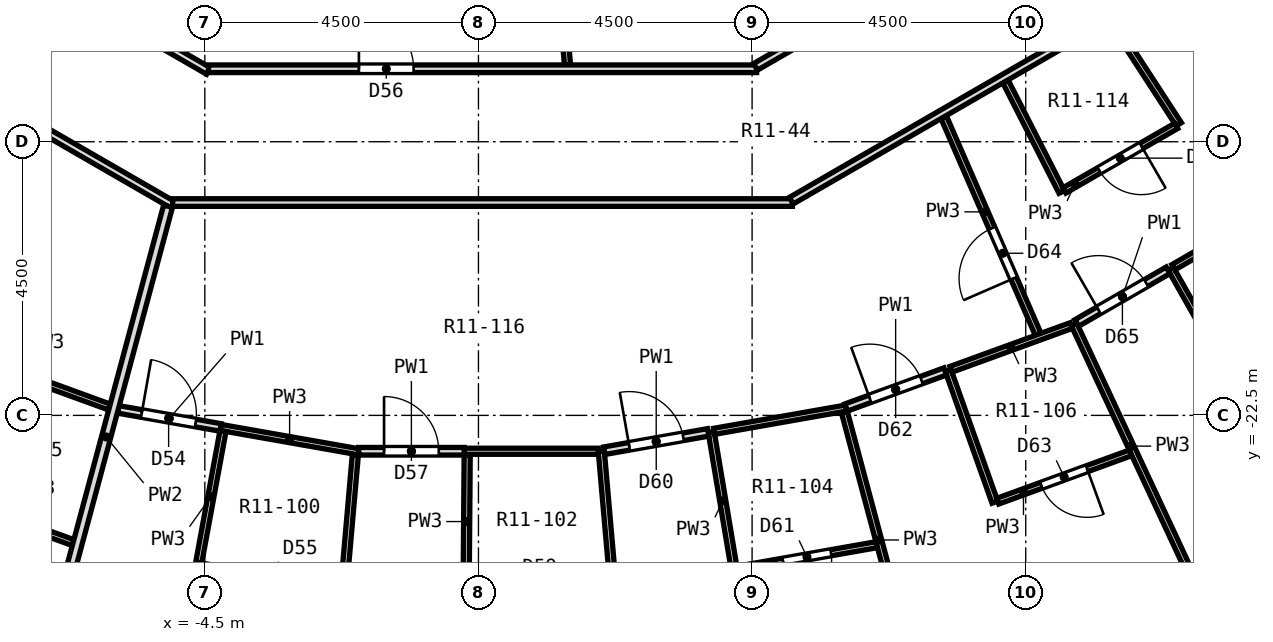
"""IFC4 building model, lengths in metres.
Left out: names, types, materials, properties, quantities, classifications, styles, units other than length and angle.
Written with IfcOpenShell. Run it as: python <this file> out.ifc"""

import sys

from ifc_helpers import new_model, si_unit, direction, frame, frame_2d, origin, origin_2d, place, context, subcontext, project, spatial, rectangle, extrude, element, fill, save


model = new_model("IFC4")
c1 = context("Model", 3, precision=1e-05, world=origin(), true_north=direction((0.0, 1.0)))
c2 = subcontext(c1, "Body", "Model", "MODEL_VIEW")
j1 = project(units=[si_unit("LENGTHUNIT", "METRE"), si_unit("PLANEANGLEUNIT", "RADIAN")], contexts=[c1])
p1 = place(None, origin())
s1 = spatial("IfcSite", under=j1, at=p1, CompositionType="ELEMENT")
p2 = place(p1, origin())
s2 = spatial("IfcBuilding", under=s1, at=p2, CompositionType="ELEMENT")
p3 = place(p2, frame((0.0, 0.0, 46.1)))
s3 = spatial("IfcBuildingStorey", under=s2, at=p3, CompositionType="ELEMENT", Elevation=46.1)
p4 = place(p3, frame((11.897, -25.512, 0.0), z_axis=(0.0, 0.0, 1.0), x_axis=(0.422618261741, -0.906307787037, 0.0)))
e1 = element("IfcColumn", 1, at=p4, inside=s3, PredefinedType="COLUMN", context=c2, shape_type="SweptSolid", body=[
    extrude(rectangle(XDim=1.1, YDim=1.1, at=origin_2d()), origin(), (0.0, 0.0, 1.0), 3.3),
])
p5 = place(p3, frame((1.119, -12.8, 0.0), z_axis=(0.0, 0.0, 1.0), x_axis=(0.087327835862, -0.996179626917, 0.0)))
e2 = element("IfcWall", 2, at=p5, inside=s3, PredefinedType="PARTITIONING", context=c2, shape_type="SweptSolid", body=[
    extrude(rectangle(XDim=3.953, YDim=0.1, at=frame_2d((1.977, 0.0))), origin(), (0.0, 0.0, 1.0), 2.75),
])
p6 = place(p3, frame((2.02, -23.09, 0.0), z_axis=(0.0, 0.0, 1.0), x_axis=(0.087326902968, -0.996179708696, 0.0)))
e3 = element("IfcWall", 3, at=p6, inside=s3, PredefinedType="PARTITIONING", context=c2, shape_type="SweptSolid", body=[
    extrude(rectangle(XDim=4.412, YDim=0.1, at=frame_2d((2.206, 0.0))), origin(), (0.0, 0.0, 1.0), 2.75),
])
p7 = place(p3, frame((3.827, -22.771, 0.0), z_axis=(0.0, 0.0, 1.0), x_axis=(0.165707124798, -0.98617500921, 0.0)))
e4 = element("IfcWall", 4, at=p7, inside=s3, PredefinedType="PARTITIONING", context=c2, shape_type="SweptSolid", body=[
    extrude(rectangle(XDim=2.3, YDim=0.1, at=frame_2d((1.15, 0.0))), origin(), (0.0, 0.0, 1.0), 2.75),
])
p8 = place(p3, frame((6.018, -22.448, 0.0), z_axis=(0.0, 0.0, 1.0), x_axis=(0.258193625059, -0.966093190111, 0.0)))
e5 = element("IfcWall", 5, at=p8, inside=s3, PredefinedType="PARTITIONING", context=c2, shape_type="SweptSolid", body=[
    extrude(rectangle(XDim=4.35, YDim=0.1, at=frame_2d((2.175, 0.0))), origin(), (0.0, 0.0, 1.0), 2.75),
])
p9 = place(p3, frame((7.723, -21.76, 0.0), z_axis=(0.0, 0.0, 1.0), x_axis=(0.334695622164, -0.942326291952, 0.0)))
e6 = element("IfcWall", 6, at=p9, inside=s3, PredefinedType="PARTITIONING", context=c2, shape_type="SweptSolid", body=[
    extrude(rectangle(XDim=2.301, YDim=0.1, at=frame_2d((1.15, 0.0))), origin(), (0.0, 0.0, 1.0), 2.75),
])
p10 = place(p3, frame((7.65, -17.594, 0.0), z_axis=(0.0, 0.0, 1.0), x_axis=(0.398813158587, -0.917032204744, 0.0)))
e7 = element("IfcWall", 7, at=p10, inside=s3, PredefinedType="PARTITIONING", context=c2, shape_type="SweptSolid", body=[
    extrude(rectangle(XDim=3.897, YDim=0.1, at=frame_2d((1.948, 0.0))), origin(), (0.0, 0.0, 1.0), 2.75),
])
p11 = place(p10, frame((1.992, 0.0, 0.0)))
e8 = element("IfcOpeningElement", 8, at=p11, cuts=e7, PredefinedType="OPENING", context=c2, shape_type="SweptSolid", body=[
    extrude(rectangle(XDim=0.9, YDim=2.1, at=frame_2d((0.45, 1.05))), frame((0.0, 0.062, 0.0), z_axis=(0.0, -1.0, 0.0), x_axis=(1.0, 0.0, 0.0)), (0.0, 0.0, 1.0), 0.124),
])
p12 = place(p3, frame((9.795, -21.006, 0.0), z_axis=(0.0, 0.0, 1.0), x_axis=(0.422658280027, -0.906289125127, 0.0)))
e9 = element("IfcWall", 9, at=p12, inside=s3, PredefinedType="PARTITIONING", context=c2, shape_type="SweptSolid", body=[
    extrude(rectangle(XDim=4.413, YDim=0.1, at=frame_2d((2.206, 0.0))), origin(), (0.0, 0.0, 1.0), 2.75),
])
p13 = place(p3, frame((8.667, -17.008, 0.0), z_axis=(0.0, 0.0, 1.0), x_axis=(0.453664033068, -0.891172791944, 0.0)))
e10 = element("IfcWall", 10, at=p13, inside=s3, PredefinedType="PARTITIONING", context=c2, shape_type="SweptSolid", body=[
    extrude(rectangle(XDim=2.04, YDim=0.1, at=frame_2d((1.02, 0.0))), origin(), (0.0, 0.0, 1.0), 2.75),
])
p14 = place(p3, frame((11.385, -20.089, 0.0), z_axis=(0.0, 0.0, 1.0), x_axis=(0.49306078006, -0.869994866173, 0.0)))
e11 = element("IfcWall", 11, at=p14, inside=s3, PredefinedType="PARTITIONING", context=c2, shape_type="SweptSolid", body=[
    extrude(rectangle(XDim=2.3, YDim=0.1, at=frame_2d((1.15, 0.0))), origin(), (0.0, 0.0, 1.0), 2.75),
])
p15 = place(p3, frame((10.406, -16.003, 0.0), z_axis=(0.0, 0.0, 1.0), x_axis=(0.545026202076, -0.838419011623, 0.0)))
e12 = element("IfcWall", 12, at=p15, inside=s3, PredefinedType="PARTITIONING", context=c2, shape_type="SweptSolid", body=[
    extrude(rectangle(XDim=2.04, YDim=0.1, at=frame_2d((1.02, 0.0))), origin(), (0.0, 0.0, 1.0), 2.75),
])
p16 = place(p3, frame((-13.855, -13.94, 0.0), z_axis=(0.0, 0.0, 1.0), x_axis=(0.866024825845, -0.50000100102, 0.0)))
e13 = element("IfcWall", 13, at=p16, inside=s3, PredefinedType="PARTITIONING", context=c2, shape_type="SweptSolid", body=[
    extrude(rectangle(XDim=10.192, YDim=0.125, at=frame_2d((5.096, 0.0))), origin(), (0.0, 0.0, 1.0), 2.75),
])
p17 = place(p3, frame((-12.298, -12.298, 0.0), z_axis=(0.0, 0.0, 1.0), x_axis=(0.865982621983, -0.500074092933, 0.0)))
e14 = element("IfcWall", 14, at=p17, inside=s3, PredefinedType="PARTITIONING", context=c2, shape_type="SweptSolid", body=[
    extrude(rectangle(XDim=9.075, YDim=0.125, at=frame_2d((4.537, 0.0))), origin(), (0.0, 0.0, 1.0), 2.75),
])
p18 = place(p17, frame((3.281, 0.0, 0.0)))
e15 = element("IfcOpeningElement", 15, at=p18, cuts=e14, PredefinedType="OPENING", context=c2, shape_type="SweptSolid", body=[
    extrude(rectangle(XDim=0.9, YDim=2.1, at=frame_2d((0.45, 1.05))), frame((0.0, 0.074, 0.0), z_axis=(0.0, -1.0, 0.0), x_axis=(1.0, 0.0, 0.0)), (0.0, 0.0, 1.0), 0.149),
])
p19 = place(p3, frame((-8.875, -23.789, 0.0), z_axis=(0.0, 0.0, 1.0), x_axis=(0.939775222713, -0.341793111069, 0.0)))
e16 = element("IfcWall", 16, at=p19, inside=s3, PredefinedType="PARTITIONING", context=c2, shape_type="SweptSolid", body=[
    extrude(rectangle(XDim=2.35, YDim=0.1, at=frame_2d((1.175, 0.0))), origin(), (0.0, 0.0, 1.0), 2.75),
])
p20 = place(p19, frame((0.812, 0.0, 0.0)))
e17 = element("IfcOpeningElement", 17, at=p20, cuts=e16, PredefinedType="OPENING", context=c2, shape_type="SweptSolid", body=[
    extrude(rectangle(XDim=0.8, YDim=2.1, at=frame_2d((0.4, 1.05))), frame((0.0, 0.062, 0.0), z_axis=(0.0, -1.0, 0.0), x_axis=(1.0, 0.0, 0.0)), (0.0, 0.0, 1.0), 0.124),
])
p21 = place(p3, frame((-8.118, -21.617, 0.0), z_axis=(0.0, 0.0, 1.0), x_axis=(0.939718185991, -0.341949895332, 0.0)))
e18 = element("IfcWall", 18, at=p21, inside=s3, PredefinedType="PARTITIONING", context=c2, shape_type="SweptSolid", body=[
    extrude(rectangle(XDim=2.18, YDim=0.1, at=frame_2d((1.09, 0.0))), origin(), (0.0, 0.0, 1.0), 2.75),
])
p22 = place(p3, frame((-4.609, -24.969, 0.0), z_axis=(0.0, 0.0, 1.0), x_axis=(0.984808388541, -0.173644573363, 0.0)))
e19 = element("IfcWall", 19, at=p22, inside=s3, PredefinedType="PARTITIONING", context=c2, shape_type="SweptSolid", body=[
    extrude(rectangle(XDim=2.375, YDim=0.1, at=frame_2d((1.188, 0.0))), origin(), (0.0, 0.0, 1.0), 2.75),
])
p23 = place(p22, frame((0.812, 0.0, 0.0)))
e20 = element("IfcOpeningElement", 20, at=p23, cuts=e19, PredefinedType="OPENING", context=c2, shape_type="SweptSolid", body=[
    extrude(rectangle(XDim=0.8, YDim=2.1, at=frame_2d((0.4, 1.05))), frame((0.0, 0.062, 0.0), z_axis=(0.0, -1.0, 0.0), x_axis=(1.0, 0.0, 0.0)), (0.0, 0.0, 1.0), 0.124),
])
p24 = place(p3, frame((-4.241, -22.698, 0.0), z_axis=(0.0, 0.0, 1.0), x_axis=(0.984796344358, -0.173712866935, 0.0)))
e21 = element("IfcWall", 21, at=p24, inside=s3, PredefinedType="PARTITIONING", context=c2, shape_type="SweptSolid", body=[
    extrude(rectangle(XDim=2.306, YDim=0.1, at=frame_2d((1.153, 0.0))), origin(), (0.0, 0.0, 1.0), 2.75),
])
p25 = place(p3, frame((-5.925, -22.401, 0.0), z_axis=(0.0, 0.0, 1.0), x_axis=(0.984786433544, -0.173769043008, 0.0)))
e22 = element("IfcWall", 22, at=p25, inside=s3, PredefinedType="PARTITIONING", context=c2, shape_type="SweptSolid", body=[
    extrude(rectangle(XDim=1.71, YDim=0.125, at=frame_2d((0.855, 0.0))), origin(), (0.0, 0.0, 1.0), 2.75),
])
p26 = place(p25, frame((0.393, 0.0, 0.0)))
e23 = element("IfcOpeningElement", 23, at=p26, cuts=e22, PredefinedType="OPENING", context=c2, shape_type="SweptSolid", body=[
    extrude(rectangle(XDim=0.9, YDim=2.1, at=frame_2d((0.45, 1.05))), frame((0.0, 0.074, 0.0), z_axis=(0.0, -1.0, 0.0), x_axis=(1.0, 0.0, 0.0)), (0.0, 0.0, 1.0), 0.149),
])
p27 = place(p3, frame((-0.235, -23.09, 0.0), z_axis=(0.0, 0.0, 1.0), x_axis=(1.0, 0.0, 0.0)))
e24 = element("IfcWall", 24, at=p27, inside=s3, PredefinedType="PARTITIONING", context=c2, shape_type="SweptSolid", body=[
    extrude(rectangle(XDim=2.205, YDim=0.1, at=frame_2d((1.103, 0.0))), origin(), (0.0, 0.0, 1.0), 2.75),
])
p28 = place(p3, frame((-1.97, -23.09, 0.0), z_axis=(0.0, 0.0, 1.0), x_axis=(1.0, 0.0, 0.0)))
e25 = element("IfcWall", 25, at=p28, inside=s3, PredefinedType="PARTITIONING", context=c2, shape_type="SweptSolid", body=[
    extrude(rectangle(XDim=1.735, YDim=0.125, at=frame_2d((0.867, 0.0))), origin(), (0.0, 0.0, 1.0), 2.75),
])
p29 = place(p28, frame((0.417, 0.0, 0.0)))
e26 = element("IfcOpeningElement", 26, at=p29, cuts=e25, PredefinedType="OPENING", context=c2, shape_type="SweptSolid", body=[
    extrude(rectangle(XDim=0.9, YDim=2.1, at=frame_2d((0.45, 1.05))), frame((0.0, 0.074, 0.0), z_axis=(0.0, -1.0, 0.0), x_axis=(1.0, 0.0, 0.0)), (0.0, 0.0, 1.0), 0.149),
])
p30 = place(p3, frame((-5.029, -19.0, 0.0), z_axis=(0.0, 0.0, 1.0), x_axis=(1.0, 0.0, 0.0)))
e27 = element("IfcWall", 27, at=p30, inside=s3, PredefinedType="PARTITIONING", context=c2, shape_type="SweptSolid", body=[
    extrude(rectangle(XDim=10.192, YDim=0.125, at=frame_2d((5.096, 0.0))), origin(), (0.0, 0.0, 1.0), 2.75),
])
p31 = place(p3, frame((-4.439, -16.8, 0.0), z_axis=(0.0, 0.0, 1.0), x_axis=(1.0, 0.0, 0.0)))
e28 = element("IfcWall", 28, at=p31, inside=s3, PredefinedType="PARTITIONING", context=c2, shape_type="SweptSolid", body=[
    extrude(rectangle(XDim=9.014, YDim=0.125, at=frame_2d((4.507, 0.0))), origin(), (0.0, 0.0, 1.0), 2.75),
])
p32 = place(p31, frame((2.473, 0.0, 0.0)))
e29 = element("IfcOpeningElement", 29, at=p32, cuts=e28, PredefinedType="OPENING", context=c2, shape_type="SweptSolid", body=[
    extrude(rectangle(XDim=0.9, YDim=2.1, at=frame_2d((0.45, 1.05))), frame((0.0, 0.074, 0.0), z_axis=(0.0, -1.0, 0.0), x_axis=(1.0, 0.0, 0.0)), (0.0, 0.0, 1.0), 0.149),
])
p33 = place(p3, frame((4.257, -25.03, 0.0), z_axis=(0.0, 0.0, 1.0), x_axis=(0.984818426074, 0.173587636842, 0.0)))
e30 = element("IfcWall", 30, at=p33, inside=s3, PredefinedType="PARTITIONING", context=c2, shape_type="SweptSolid", body=[
    extrude(rectangle(XDim=2.325, YDim=0.1, at=frame_2d((1.163, 0.0))), origin(), (0.0, 0.0, 1.0), 2.75),
])
p34 = place(p33, frame((0.762, 0.0, 0.0)))
e31 = element("IfcOpeningElement", 31, at=p34, cuts=e30, PredefinedType="OPENING", context=c2, shape_type="SweptSolid", body=[
    extrude(rectangle(XDim=0.8, YDim=2.1, at=frame_2d((0.4, 1.05))), frame((0.0, 0.062, 0.0), z_axis=(0.0, -1.0, 0.0), x_axis=(1.0, 0.0, 0.0)), (0.0, 0.0, 1.0), 0.124),
])
p35 = place(p3, frame((3.876, -22.762, 0.0), z_axis=(0.0, 0.0, 1.0), x_axis=(0.98481362095, 0.173614895648, 0.0)))
e32 = element("IfcWall", 32, at=p35, inside=s3, PredefinedType="PARTITIONING", context=c2, shape_type="SweptSolid", body=[
    extrude(rectangle(XDim=2.206, YDim=0.1, at=frame_2d((1.103, 0.0))), origin(), (0.0, 0.0, 1.0), 2.75),
])
p36 = place(p3, frame((2.069, -23.081, 0.0), z_axis=(0.0, 0.0, 1.0), x_axis=(0.984782142107, 0.173793361747, 0.0)))
e33 = element("IfcWall", 33, at=p36, inside=s3, PredefinedType="PARTITIONING", context=c2, shape_type="SweptSolid", body=[
    extrude(rectangle(XDim=1.735, YDim=0.125, at=frame_2d((0.867, 0.0))), origin(), (0.0, 0.0, 1.0), 2.75),
])
p37 = place(p36, frame((0.417, 0.0, 0.0)))
e34 = element("IfcOpeningElement", 34, at=p37, cuts=e33, PredefinedType="OPENING", context=c2, shape_type="SweptSolid", body=[
    extrude(rectangle(XDim=0.9, YDim=2.1, at=frame_2d((0.45, 1.05))), frame((0.0, 0.074, 0.0), z_axis=(0.0, -1.0, 0.0), x_axis=(1.0, 0.0, 0.0)), (0.0, 0.0, 1.0), 0.149),
])
p38 = place(p3, frame((8.54, -23.911, 0.0), z_axis=(0.0, 0.0, 1.0), x_axis=(0.939716717369, 0.34195393125, 0.0)))
e35 = element("IfcWall", 35, at=p38, inside=s3, PredefinedType="PARTITIONING", context=c2, shape_type="SweptSolid", body=[
    extrude(rectangle(XDim=2.324, YDim=0.1, at=frame_2d((1.162, 0.0))), origin(), (0.0, 0.0, 1.0), 2.75),
])
p39 = place(p38, frame((0.762, 0.0, 0.0)))
e36 = element("IfcOpeningElement", 36, at=p39, cuts=e35, PredefinedType="OPENING", context=c2, shape_type="SweptSolid", body=[
    extrude(rectangle(XDim=0.8, YDim=2.1, at=frame_2d((0.4, 1.05))), frame((0.0, 0.062, 0.0), z_axis=(0.0, -1.0, 0.0), x_axis=(1.0, 0.0, 0.0)), (0.0, 0.0, 1.0), 0.124),
])
p40 = place(p3, frame((7.77, -21.743, 0.0), z_axis=(0.0, 0.0, 1.0), x_axis=(0.939725675468, 0.341929312674, 0.0)))
e37 = element("IfcWall", 37, at=p40, inside=s3, PredefinedType="PARTITIONING", context=c2, shape_type="SweptSolid", body=[
    extrude(rectangle(XDim=2.105, YDim=0.1, at=frame_2d((1.052, 0.0))), origin(), (0.0, 0.0, 1.0), 2.75),
])
p41 = place(p3, frame((6.046, -22.371, 0.0), z_axis=(0.0, 0.0, 1.0), x_axis=(0.939612508188, 0.342240170722, 0.0)))
e38 = element("IfcWall", 38, at=p41, inside=s3, PredefinedType="PARTITIONING", context=c2, shape_type="SweptSolid", body=[
    extrude(rectangle(XDim=1.735, YDim=0.125, at=frame_2d((0.867, 0.0))), origin(), (0.0, 0.0, 1.0), 2.75),
])
p42 = place(p41, frame((0.417, 0.0, 0.0)))
e39 = element("IfcOpeningElement", 39, at=p42, cuts=e38, PredefinedType="OPENING", context=c2, shape_type="SweptSolid", body=[
    extrude(rectangle(XDim=0.9, YDim=2.1, at=frame_2d((0.45, 1.05))), frame((0.0, 0.074, 0.0), z_axis=(0.0, -1.0, 0.0), x_axis=(1.0, 0.0, 0.0)), (0.0, 0.0, 1.0), 0.149),
])
p43 = place(p3, frame((11.428, -20.064, 0.0), z_axis=(0.0, 0.0, 1.0), x_axis=(0.865870655861, 0.50026793553, 0.0)))
e40 = element("IfcWall", 40, at=p43, inside=s3, PredefinedType="PARTITIONING", context=c2, shape_type="SweptSolid", body=[
    extrude(rectangle(XDim=2.105, YDim=0.1, at=frame_2d((1.052, 0.0))), origin(), (0.0, 0.0, 1.0), 2.75),
])
p44 = place(p3, frame((9.838, -20.981, 0.0), z_axis=(0.0, 0.0, 1.0), x_axis=(0.866288616225, 0.499543825303, 0.0)))
e41 = element("IfcWall", 41, at=p44, inside=s3, PredefinedType="PARTITIONING", context=c2, shape_type="SweptSolid", body=[
    extrude(rectangle(XDim=1.735, YDim=0.125, at=frame_2d((0.868, 0.0))), origin(), (0.0, 0.0, 1.0), 2.75),
])
p45 = place(p44, frame((0.418, 0.0, 0.0)))
e42 = element("IfcOpeningElement", 42, at=p45, cuts=e41, PredefinedType="OPENING", context=c2, shape_type="SweptSolid", body=[
    extrude(rectangle(XDim=0.9, YDim=2.1, at=frame_2d((0.45, 1.05))), frame((0.0, 0.074, 0.0), z_axis=(0.0, -1.0, 0.0), x_axis=(1.0, 0.0, 0.0)), (0.0, 0.0, 1.0), 0.149),
])
p46 = place(p3, frame((9.635, -18.801, 0.0), z_axis=(0.0, 0.0, 1.0), x_axis=(0.866013304951, 0.500020955208, 0.0)))
e43 = element("IfcWall", 43, at=p46, inside=s3, PredefinedType="PARTITIONING", context=c2, shape_type="SweptSolid", body=[
    extrude(rectangle(XDim=2.124, YDim=0.1, at=frame_2d((1.062, 0.0))), origin(), (0.0, 0.0, 1.0), 2.75),
])
p47 = place(p46, frame((0.662, 0.0, 0.0)))
e44 = element("IfcOpeningElement", 44, at=p47, cuts=e43, PredefinedType="OPENING", context=c2, shape_type="SweptSolid", body=[
    extrude(rectangle(XDim=0.8, YDim=2.1, at=frame_2d((0.4, 1.05))), frame((0.0, 0.062, 0.0), z_axis=(0.0, -1.0, 0.0), x_axis=(1.0, 0.0, 0.0)), (0.0, 0.0, 1.0), 0.124),
])
p48 = place(p3, frame((5.145, -18.969, 0.0), z_axis=(0.0, 0.0, 1.0), x_axis=(0.866035198373, 0.499983034892, 0.0)))
e45 = element("IfcWall", 45, at=p48, inside=s3, PredefinedType="PARTITIONING", context=c2, shape_type="SweptSolid", body=[
    extrude(rectangle(XDim=10.192, YDim=0.125, at=frame_2d((5.096, 0.0))), origin(), (0.0, 0.0, 1.0), 2.75),
])
p49 = place(p48, frame((7.577, 0.0, 0.0)))
e46 = element("IfcOpeningElement", 46, at=p49, cuts=e45, PredefinedType="OPENING", context=c2, shape_type="SweptSolid", body=[
    extrude(rectangle(XDim=1.0, YDim=2.1, at=frame_2d((0.5, 1.05))), frame((0.0, 0.074, 0.0), z_axis=(0.0, -1.0, 0.0), x_axis=(1.0, 0.0, 0.0)), (0.0, 0.0, 1.0), 0.149),
])
p50 = place(p3, frame((4.556, -16.769, 0.0), z_axis=(0.0, 0.0, 1.0), x_axis=(0.865979941794, 0.500078734211, 0.0)))
e47 = element("IfcWall", 47, at=p50, inside=s3, PredefinedType="PARTITIONING", context=c2, shape_type="SweptSolid", body=[
    extrude(rectangle(XDim=8.877, YDim=0.125, at=frame_2d((4.439, 0.0))), origin(), (0.0, 0.0, 1.0), 2.75),
])
p51 = place(p50, frame((3.989, 0.0, 0.0)))
e48 = element("IfcOpeningElement", 48, at=p51, cuts=e47, PredefinedType="OPENING", context=c2, shape_type="SweptSolid", body=[
    extrude(rectangle(XDim=0.9, YDim=2.1, at=frame_2d((0.45, 1.05))), frame((0.0, 0.074, 0.0), z_axis=(0.0, -1.0, 0.0), x_axis=(1.0, 0.0, 0.0)), (0.0, 0.0, 1.0), 0.149),
])
p52 = place(p3, frame((-7.141, -26.65, 0.0), z_axis=(0.0, 0.0, 1.0), x_axis=(0.259110891803, 0.965847578943, 0.0)))
e49 = element("IfcWall", 49, at=p52, inside=s3, PredefinedType="PARTITIONING", context=c2, shape_type="SweptSolid", body=[
    extrude(rectangle(XDim=7.857, YDim=0.15, at=frame_2d((3.929, 0.0))), origin(), (0.0, 0.0, 1.0), 2.75),
])
p53 = place(p3, frame((-4.6, -24.92, 0.0), z_axis=(0.0, 0.0, 1.0), x_axis=(0.181199143807, 0.983446424714, 0.0)))
e50 = element("IfcWall", 50, at=p53, inside=s3, PredefinedType="PARTITIONING", context=c2, shape_type="SweptSolid", body=[
    extrude(rectangle(XDim=2.2, YDim=0.1, at=frame_2d((1.1, 0.0))), origin(), (0.0, 0.0, 1.0), 2.75),
])
p54 = place(p3, frame((-2.404, -27.485, 0.0), z_axis=(0.0, 0.0, 1.0), x_axis=(0.087174609927, 0.996193047247, 0.0)))
e51 = element("IfcWall", 51, at=p54, inside=s3, PredefinedType="PARTITIONING", context=c2, shape_type="SweptSolid", body=[
    extrude(rectangle(XDim=4.349, YDim=0.1, at=frame_2d((2.175, 0.0))), origin(), (0.0, 0.0, 1.0), 2.75),
])
p55 = place(p3, frame((-0.203, -25.34, 0.0), z_axis=(0.0, 0.0, 1.0), x_axis=(0.007812261592, 0.999969483819, 0.0)))
e52 = element("IfcWall", 52, at=p55, inside=s3, PredefinedType="PARTITIONING", context=c2, shape_type="SweptSolid", body=[
    extrude(rectangle(XDim=2.188, YDim=0.1, at=frame_2d((1.094, 0.0))), origin(), (0.0, 0.0, 1.0), 2.75),
])
p56 = place(p26, origin())
e53 = element("IfcDoor", 53, at=p56, inside=s3, OperationType="SINGLE_SWING_LEFT", PredefinedType="DOOR", context=c2, shape_type="SweptSolid", body=[
    extrude(rectangle(XDim=0.9, YDim=2.1, at=frame_2d((0.45, 1.05))), frame((0.0, 0.025, 0.0), z_axis=(0.0, -1.0, 0.0), x_axis=(1.0, 0.0, 0.0)), (0.0, 0.0, 1.0), 0.05),
])
fill(e23, e53)
p57 = place(p32, origin())
e54 = element("IfcDoor", 54, at=p57, inside=s3, OperationType="SINGLE_SWING_LEFT", PredefinedType="DOOR", context=c2, shape_type="SweptSolid", body=[
    extrude(rectangle(XDim=0.9, YDim=2.1, at=frame_2d((0.45, 1.05))), frame((0.0, 0.025, 0.0), z_axis=(0.0, -1.0, 0.0), x_axis=(1.0, 0.0, 0.0)), (0.0, 0.0, 1.0), 0.05),
])
fill(e29, e54)
p58 = place(p29, origin())
e55 = element("IfcDoor", 55, at=p58, inside=s3, OperationType="SINGLE_SWING_LEFT", PredefinedType="DOOR", context=c2, shape_type="SweptSolid", body=[
    extrude(rectangle(XDim=0.9, YDim=2.1, at=frame_2d((0.45, 1.05))), frame((0.0, 0.025, 0.0), z_axis=(0.0, -1.0, 0.0), x_axis=(1.0, 0.0, 0.0)), (0.0, 0.0, 1.0), 0.05),
])
fill(e26, e55)
p59 = place(p37, origin())
e56 = element("IfcDoor", 56, at=p59, inside=s3, OperationType="SINGLE_SWING_LEFT", PredefinedType="DOOR", context=c2, shape_type="SweptSolid", body=[
    extrude(rectangle(XDim=0.9, YDim=2.1, at=frame_2d((0.45, 1.05))), frame((0.0, 0.025, 0.0), z_axis=(0.0, -1.0, 0.0), x_axis=(1.0, 0.0, 0.0)), (0.0, 0.0, 1.0), 0.05),
])
fill(e34, e56)
p60 = place(p34, frame((0.8, 0.0, 0.0), z_axis=(0.0, 0.0, 1.0), x_axis=(-1.0, 0.0, 0.0)))
e57 = element("IfcDoor", 57, at=p60, inside=s3, OperationType="SINGLE_SWING_RIGHT", PredefinedType="DOOR", context=c2, shape_type="SweptSolid", body=[
    extrude(rectangle(XDim=0.8, YDim=2.1, at=frame_2d((0.4, 1.05))), frame((0.0, 0.025, 0.0), z_axis=(0.0, -1.0, 0.0), x_axis=(1.0, 0.0, 0.0)), (0.0, 0.0, 1.0), 0.05),
])
fill(e31, e57)
p61 = place(p42, origin())
e58 = element("IfcDoor", 58, at=p61, inside=s3, OperationType="SINGLE_SWING_LEFT", PredefinedType="DOOR", context=c2, shape_type="SweptSolid", body=[
    extrude(rectangle(XDim=0.9, YDim=2.1, at=frame_2d((0.45, 1.05))), frame((0.0, 0.025, 0.0), z_axis=(0.0, -1.0, 0.0), x_axis=(1.0, 0.0, 0.0)), (0.0, 0.0, 1.0), 0.05),
])
fill(e39, e58)
p62 = place(p39, frame((0.8, 0.0, 0.0), z_axis=(0.0, 0.0, 1.0), x_axis=(-1.0, 0.0, 0.0)))
e59 = element("IfcDoor", 59, at=p62, inside=s3, OperationType="SINGLE_SWING_LEFT", PredefinedType="DOOR", context=c2, shape_type="SweptSolid", body=[
    extrude(rectangle(XDim=0.8, YDim=2.1, at=frame_2d((0.4, 1.05))), frame((0.0, 0.025, 0.0), z_axis=(0.0, -1.0, 0.0), x_axis=(1.0, 0.0, 0.0)), (0.0, 0.0, 1.0), 0.05),
])
fill(e36, e59)
p63 = place(p11, frame((0.9, 0.0, 0.0), z_axis=(0.0, 0.0, 1.0), x_axis=(-1.0, 0.0, 0.0)))
e60 = element("IfcDoor", 60, at=p63, inside=s3, OperationType="SINGLE_SWING_LEFT", PredefinedType="DOOR", context=c2, shape_type="SweptSolid", body=[
    extrude(rectangle(XDim=0.9, YDim=2.1, at=frame_2d((0.45, 1.05))), frame((0.0, 0.025, 0.0), z_axis=(0.0, -1.0, 0.0), x_axis=(1.0, 0.0, 0.0)), (0.0, 0.0, 1.0), 0.05),
])
fill(e8, e60)
p64 = place(p45, origin())
e61 = element("IfcDoor", 61, at=p64, inside=s3, OperationType="SINGLE_SWING_LEFT", PredefinedType="DOOR", context=c2, shape_type="SweptSolid", body=[
    extrude(rectangle(XDim=0.9, YDim=2.1, at=frame_2d((0.45, 1.05))), frame((0.0, 0.025, 0.0), z_axis=(0.0, -1.0, 0.0), x_axis=(1.0, 0.0, 0.0)), (0.0, 0.0, 1.0), 0.05),
])
fill(e42, e61)
p65 = place(p47, frame((0.8, 0.0, 0.0), z_axis=(0.0, 0.0, 1.0), x_axis=(-1.0, 0.0, 0.0)))
e62 = element("IfcDoor", 62, at=p65, inside=s3, OperationType="SINGLE_SWING_LEFT", PredefinedType="DOOR", context=c2, shape_type="SweptSolid", body=[
    extrude(rectangle(XDim=0.8, YDim=2.1, at=frame_2d((0.4, 1.05))), frame((0.0, 0.025, 0.0), z_axis=(0.0, -1.0, 0.0), x_axis=(1.0, 0.0, 0.0)), (0.0, 0.0, 1.0), 0.05),
])
fill(e44, e62)
save(model, sys.argv[1])
